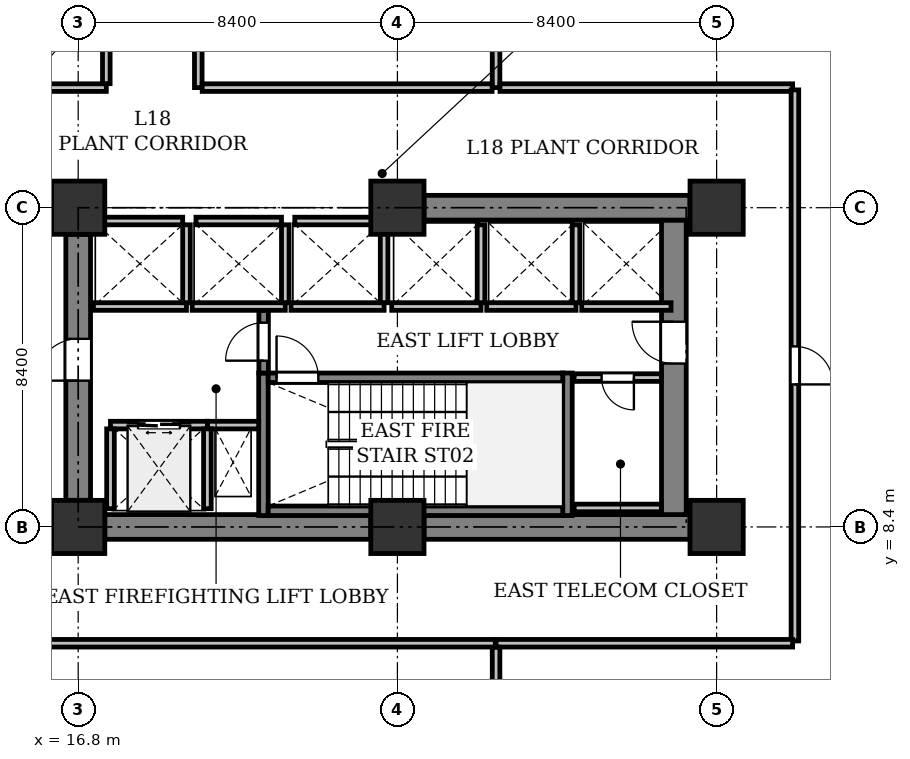
"""IFC4 building model, lengths in metres.
Left out: names, types, materials, properties, quantities, classifications, styles, units other than length and angle.
Written with IfcOpenShell. Run it as: python <this file> out.ifc"""

import sys

from ifc_helpers import new_model, si_unit, direction, frame, frame_2d, origin, origin_2d, place, context, subcontext, project, spatial, rectangle, extrude, element, fill, save


model = new_model("IFC4")
c1 = context("Model", 3, precision=1e-05, world=origin(), true_north=direction((0.0, 1.0)))
c2 = subcontext(c1, "Body", "Model", "MODEL_VIEW")
j1 = project(units=[si_unit("LENGTHUNIT", "METRE"), si_unit("PLANEANGLEUNIT", "RADIAN")], contexts=[c1])
p1 = place(None, origin())
s1 = spatial("IfcSite", under=j1, at=p1, CompositionType="ELEMENT")
p2 = place(p1, origin())
s2 = spatial("IfcBuilding", under=s1, at=p2, CompositionType="ELEMENT")
p3 = place(p2, frame((0.0, 0.0, 79.4)))
s3 = spatial("IfcBuildingStorey", under=s2, at=p3, CompositionType="ELEMENT", Elevation=79.4)
for number, where, z_axis, x_axis in (
    (1, (16.8, 8.4, 0.0), (0.0, 0.0, 1.0), (1.0, 0.0, 0.0)),
    (2, (16.8, 16.8, 0.0), (0.0, 0.0, 1.0), (1.0, 0.0, 0.0)),
    (3, (25.2, 8.4, 0.0), (0.0, 0.0, 1.0), (1.0, 0.0, 0.0)),
    (4, (25.2, 16.8, 0.0), (0.0, 0.0, 1.0), (1.0, 0.0, 0.0)),
    (5, (33.6, 8.4, 0.0), (0.0, 0.0, 1.0), (1.0, 0.0, 0.0)),
    (6, (33.6, 16.8, 0.0), (0.0, 0.0, 1.0), (1.0, 0.0, 0.0)),
):
    element("IfcColumn", number, at=place(p3, frame(where, z_axis=z_axis, x_axis=x_axis)), inside=s3, PredefinedType="COLUMN", context=c2, shape_type="SweptSolid", body=[
        extrude(rectangle(XDim=1.4, YDim=1.4, at=origin_2d()), origin(), (0.0, 0.0, 1.0), 5.0),
    ])
for number, where, z_axis, x_axis in (
    (7, (17.5, 8.4, 0.0), (0.0, 0.0, 1.0), (1.0, 0.0, 0.0)),
    (8, (25.9, 8.4, 0.0), (0.0, 0.0, 1.0), (1.0, 0.0, 0.0)),
):
    element("IfcWall", number, at=place(p3, frame(where, z_axis=z_axis, x_axis=x_axis)), inside=s3, PredefinedType="SHEAR", context=c2, shape_type="SweptSolid", body=[
        extrude(rectangle(XDim=7.0, YDim=0.65, at=frame_2d((3.5, 0.0))), origin(), (0.0, 0.0, 1.0), 4.725),
    ])
p4 = place(p3, frame((32.475, 8.725, 0.0), z_axis=(0.0, 0.0, 1.0), x_axis=(0.0, 1.0, 0.0)))
e9 = element("IfcWall", 9, at=p4, inside=s3, PredefinedType="SHEAR", context=c2, shape_type="SweptSolid", body=[
    extrude(rectangle(XDim=7.75, YDim=0.65, at=frame_2d((3.875, 0.0))), origin(), (0.0, 0.0, 1.0), 4.725),
])
p5 = place(p4, frame((3.975, 0.0, 0.0)))
e10 = element("IfcOpeningElement", 10, at=p5, cuts=e9, PredefinedType="OPENING", context=c2, shape_type="SweptSolid", body=[
    extrude(rectangle(XDim=1.1, YDim=2.15, at=frame_2d((0.55, 1.075))), frame((0.0, 0.335, 0.0), z_axis=(0.0, -1.0, 0.0), x_axis=(1.0, 0.0, 0.0)), (0.0, 0.0, 1.0), 0.67),
])
p6 = place(p3, frame((16.8, 9.1, 0.0), z_axis=(0.0, 0.0, 1.0), x_axis=(0.0, 1.0, 0.0)))
e11 = element("IfcWall", 11, at=p6, inside=s3, PredefinedType="SHEAR", context=c2, shape_type="SweptSolid", body=[
    extrude(rectangle(XDim=7.0, YDim=0.65, at=frame_2d((3.5, 0.0))), origin(), (0.0, 0.0, 1.0), 4.725),
])
p7 = place(p6, frame((3.15, 0.0, 0.0)))
e12 = element("IfcOpeningElement", 12, at=p7, cuts=e11, PredefinedType="OPENING", context=c2, shape_type="SweptSolid", body=[
    extrude(rectangle(XDim=1.1, YDim=2.15, at=frame_2d((0.55, 1.075))), frame((0.0, 0.335, 0.0), z_axis=(0.0, -1.0, 0.0), x_axis=(1.0, 0.0, 0.0)), (0.0, 0.0, 1.0), 0.67),
])
p8 = place(p3, frame((25.9, 16.8, 0.0), z_axis=(0.0, 0.0, 1.0), x_axis=(1.0, 0.0, 0.0)))
e13 = element("IfcWall", 13, at=p8, inside=s3, PredefinedType="SHEAR", context=c2, shape_type="SweptSolid", body=[
    extrude(rectangle(XDim=7.0, YDim=0.65, at=frame_2d((3.5, 0.0))), origin(), (0.0, 0.0, 1.0), 4.725),
])
for number, where, z_axis, x_axis in (
    (14, (21.675, 8.7, 0.0), (0.0, 0.0, 1.0), (0.0, 1.0, 0.0)),
    (15, (29.675, 8.7, 0.0), (0.0, 0.0, 1.0), (0.0, 1.0, 0.0)),
):
    element("IfcWall", number, at=place(p3, frame(where, z_axis=z_axis, x_axis=x_axis)), inside=s3, PredefinedType="SHEAR", context=c2, shape_type="SweptSolid", body=[
        extrude(rectangle(XDim=3.75, YDim=0.25, at=frame_2d((1.875, 0.0))), origin(), (0.0, 0.0, 1.0), 4.725),
    ])
p9 = place(p3, frame((21.8, 8.825, 0.0), z_axis=(0.0, 0.0, 1.0), x_axis=(1.0, 0.0, 0.0)))
e16 = element("IfcWall", 16, at=p9, inside=s3, PredefinedType="SHEAR", context=c2, shape_type="SweptSolid", body=[
    extrude(rectangle(XDim=7.75, YDim=0.25, at=frame_2d((3.875, 0.0))), origin(), (0.0, 0.0, 1.0), 4.725),
])
p10 = place(p3, frame((21.8, 12.325, 0.0), z_axis=(0.0, 0.0, 1.0), x_axis=(1.0, 0.0, 0.0)))
e17 = element("IfcWall", 17, at=p10, inside=s3, PredefinedType="SHEAR", context=c2, shape_type="SweptSolid", body=[
    extrude(rectangle(XDim=7.75, YDim=0.25, at=frame_2d((3.875, 0.0))), origin(), (0.0, 0.0, 1.0), 4.725),
])
p11 = place(p10, frame((0.22, 0.0, 0.0)))
e18 = element("IfcOpeningElement", 18, at=p11, cuts=e17, PredefinedType="OPENING", context=c2, shape_type="SweptSolid", body=[
    extrude(rectangle(XDim=1.1, YDim=2.15, at=frame_2d((0.55, 1.075))), frame((0.0, 0.135, 0.0), z_axis=(0.0, -1.0, 0.0), x_axis=(1.0, 0.0, 0.0)), (0.0, 0.0, 1.0), 0.27),
])
p12 = place(p3, frame((20.2, 11.08, 0.0), z_axis=(0.0, 0.0, 1.0), x_axis=(1.0, 0.0, 0.0)))
e19 = element("IfcWall", 19, at=p12, inside=s3, PredefinedType="PARTITIONING", context=c2, shape_type="SweptSolid", body=[
    extrude(rectangle(XDim=1.35, YDim=0.2, at=frame_2d((0.675, 0.0))), origin(), (0.0, 0.0, 1.0), 4.725),
])
p13 = place(p3, frame((21.68, 12.45, 0.0), z_axis=(0.0, 0.0, 1.0), x_axis=(0.0, 1.0, 0.0)))
e20 = element("IfcWall", 20, at=p13, inside=s3, PredefinedType="SHEAR", context=c2, shape_type="SweptSolid", body=[
    extrude(rectangle(XDim=1.65, YDim=0.25, at=frame_2d((0.825, 0.0))), origin(), (0.0, 0.0, 1.0), 4.725),
])
p14 = place(p13, frame((0.325, 0.0, 0.0)))
e21 = element("IfcOpeningElement", 21, at=p14, cuts=e20, PredefinedType="OPENING", context=c2, shape_type="SweptSolid", body=[
    extrude(rectangle(XDim=1.0, YDim=2.15, at=frame_2d((0.5, 1.075))), frame((0.0, 0.135, 0.0), z_axis=(0.0, -1.0, 0.0), x_axis=(1.0, 0.0, 0.0)), (0.0, 0.0, 1.0), 0.27),
])
p15 = place(p3, frame((17.65, 11.08, 0.0), z_axis=(0.0, 0.0, 1.0), x_axis=(1.0, 0.0, 0.0)))
e22 = element("IfcWall", 22, at=p15, inside=s3, PredefinedType="PARTITIONING", context=c2, shape_type="SweptSolid", body=[
    extrude(rectangle(XDim=2.55, YDim=0.2, at=frame_2d((1.275, 0.0))), origin(), (0.0, 0.0, 1.0), 4.725),
])
p16 = place(p15, frame((0.725, 0.0, 0.0)))
e23 = element("IfcOpeningElement", 23, at=p16, cuts=e22, PredefinedType="OPENING", context=c2, shape_type="SweptSolid", body=[
    extrude(rectangle(XDim=1.1, YDim=2.2, at=frame_2d((0.55, 1.1))), frame((0.0, 0.11, 0.0), z_axis=(0.0, -1.0, 0.0), x_axis=(1.0, 0.0, 0.0)), (0.0, 0.0, 1.0), 0.22),
])
for number, where, z_axis, x_axis in (
    (24, (20.2, 8.88, 0.0), (0.0, 0.0, 1.0), (0.0, 1.0, 0.0)),
    (25, (17.65, 8.88, 0.0), (0.0, 0.0, 1.0), (0.0, 1.0, 0.0)),
):
    element("IfcWall", number, at=place(p3, frame(where, z_axis=z_axis, x_axis=x_axis)), inside=s3, PredefinedType="PARTITIONING", context=c2, shape_type="SweptSolid", body=[
        extrude(rectangle(XDim=2.1, YDim=0.2, at=frame_2d((1.05, 0.0))), origin(), (0.0, 0.0, 1.0), 4.725),
    ])
p17 = place(p3, frame((17.2, 14.2, 0.0), z_axis=(0.0, 0.0, 1.0), x_axis=(1.0, 0.0, 0.0)))
e26 = element("IfcWall", 26, at=p17, inside=s3, PredefinedType="PARTITIONING", context=c2, shape_type="SweptSolid", body=[
    extrude(rectangle(XDim=2.45, YDim=0.2, at=frame_2d((1.225, 0.0))), origin(), (0.0, 0.0, 1.0), 4.725),
])
p18 = place(p3, frame((19.65, 14.3, 0.0), z_axis=(0.0, 0.0, 1.0), x_axis=(0.0, 1.0, 0.0)))
e27 = element("IfcWall", 27, at=p18, inside=s3, PredefinedType="PARTITIONING", context=c2, shape_type="SweptSolid", body=[
    extrude(rectangle(XDim=2.05, YDim=0.2, at=frame_2d((1.025, 0.0))), origin(), (0.0, 0.0, 1.0), 4.725),
])
p19 = place(p3, frame((17.3, 16.45, 0.0), z_axis=(0.0, 0.0, 1.0), x_axis=(1.0, 0.0, 0.0)))
e28 = element("IfcWall", 28, at=p19, inside=s3, PredefinedType="PARTITIONING", context=c2, shape_type="SweptSolid", body=[
    extrude(rectangle(XDim=2.25, YDim=0.2, at=frame_2d((1.125, 0.0))), origin(), (0.0, 0.0, 1.0), 4.725),
])
p20 = place(p3, frame((19.8, 14.2, 0.0), z_axis=(0.0, 0.0, 1.0), x_axis=(1.0, 0.0, 0.0)))
e29 = element("IfcWall", 29, at=p20, inside=s3, PredefinedType="PARTITIONING", context=c2, shape_type="SweptSolid", body=[
    extrude(rectangle(XDim=2.45, YDim=0.2, at=frame_2d((1.225, 0.0))), origin(), (0.0, 0.0, 1.0), 4.725),
])
p21 = place(p3, frame((22.25, 14.3, 0.0), z_axis=(0.0, 0.0, 1.0), x_axis=(0.0, 1.0, 0.0)))
e30 = element("IfcWall", 30, at=p21, inside=s3, PredefinedType="PARTITIONING", context=c2, shape_type="SweptSolid", body=[
    extrude(rectangle(XDim=2.05, YDim=0.2, at=frame_2d((1.025, 0.0))), origin(), (0.0, 0.0, 1.0), 4.725),
])
p22 = place(p3, frame((19.9, 16.45, 0.0), z_axis=(0.0, 0.0, 1.0), x_axis=(1.0, 0.0, 0.0)))
e31 = element("IfcWall", 31, at=p22, inside=s3, PredefinedType="PARTITIONING", context=c2, shape_type="SweptSolid", body=[
    extrude(rectangle(XDim=2.25, YDim=0.2, at=frame_2d((1.125, 0.0))), origin(), (0.0, 0.0, 1.0), 4.725),
])
p23 = place(p3, frame((22.4, 14.2, 0.0), z_axis=(0.0, 0.0, 1.0), x_axis=(1.0, 0.0, 0.0)))
e32 = element("IfcWall", 32, at=p23, inside=s3, PredefinedType="PARTITIONING", context=c2, shape_type="SweptSolid", body=[
    extrude(rectangle(XDim=2.45, YDim=0.2, at=frame_2d((1.225, 0.0))), origin(), (0.0, 0.0, 1.0), 4.725),
])
p24 = place(p3, frame((24.85, 14.3, 0.0), z_axis=(0.0, 0.0, 1.0), x_axis=(0.0, 1.0, 0.0)))
e33 = element("IfcWall", 33, at=p24, inside=s3, PredefinedType="PARTITIONING", context=c2, shape_type="SweptSolid", body=[
    extrude(rectangle(XDim=2.05, YDim=0.2, at=frame_2d((1.025, 0.0))), origin(), (0.0, 0.0, 1.0), 4.725),
])
p25 = place(p3, frame((22.5, 16.45, 0.0), z_axis=(0.0, 0.0, 1.0), x_axis=(1.0, 0.0, 0.0)))
e34 = element("IfcWall", 34, at=p25, inside=s3, PredefinedType="PARTITIONING", context=c2, shape_type="SweptSolid", body=[
    extrude(rectangle(XDim=2.25, YDim=0.2, at=frame_2d((1.125, 0.0))), origin(), (0.0, 0.0, 1.0), 4.725),
])
p26 = place(p3, frame((25.05, 14.2, 0.0), z_axis=(0.0, 0.0, 1.0), x_axis=(1.0, 0.0, 0.0)))
e35 = element("IfcWall", 35, at=p26, inside=s3, PredefinedType="PARTITIONING", context=c2, shape_type="SweptSolid", body=[
    extrude(rectangle(XDim=2.35, YDim=0.2, at=frame_2d((1.175, 0.0))), origin(), (0.0, 0.0, 1.0), 4.725),
])
p27 = place(p3, frame((27.4, 14.3, 0.0), z_axis=(0.0, 0.0, 1.0), x_axis=(0.0, 1.0, 0.0)))
e36 = element("IfcWall", 36, at=p27, inside=s3, PredefinedType="PARTITIONING", context=c2, shape_type="SweptSolid", body=[
    extrude(rectangle(XDim=2.05, YDim=0.2, at=frame_2d((1.025, 0.0))), origin(), (0.0, 0.0, 1.0), 4.725),
])
p28 = place(p3, frame((27.55, 14.2, 0.0), z_axis=(0.0, 0.0, 1.0), x_axis=(1.0, 0.0, 0.0)))
e37 = element("IfcWall", 37, at=p28, inside=s3, PredefinedType="PARTITIONING", context=c2, shape_type="SweptSolid", body=[
    extrude(rectangle(XDim=2.35, YDim=0.2, at=frame_2d((1.175, 0.0))), origin(), (0.0, 0.0, 1.0), 4.725),
])
p29 = place(p3, frame((29.9, 14.3, 0.0), z_axis=(0.0, 0.0, 1.0), x_axis=(0.0, 1.0, 0.0)))
e38 = element("IfcWall", 38, at=p29, inside=s3, PredefinedType="PARTITIONING", context=c2, shape_type="SweptSolid", body=[
    extrude(rectangle(XDim=2.05, YDim=0.2, at=frame_2d((1.025, 0.0))), origin(), (0.0, 0.0, 1.0), 4.725),
])
p30 = place(p3, frame((30.05, 14.2, 0.0), z_axis=(0.0, 0.0, 1.0), x_axis=(1.0, 0.0, 0.0)))
e39 = element("IfcWall", 39, at=p30, inside=s3, PredefinedType="PARTITIONING", context=c2, shape_type="SweptSolid", body=[
    extrude(rectangle(XDim=2.35, YDim=0.2, at=frame_2d((1.175, 0.0))), origin(), (0.0, 0.0, 1.0), 4.725),
])
p31 = place(p3, frame((32.146, 12.33, 0.0), z_axis=(0.0, 0.0, 1.0), x_axis=(-1.0, 0.0, 0.0)))
e40 = element("IfcWall", 40, at=p31, inside=s3, PredefinedType="PARTITIONING", context=c2, shape_type="SweptSolid", body=[
    extrude(rectangle(XDim=2.296, YDim=0.2, at=frame_2d((1.148, 0.0))), origin(), (0.0, 0.0, 1.0), 4.725),
])
p32 = place(p31, frame((0.723, 0.0, 0.0)))
e41 = element("IfcOpeningElement", 41, at=p32, cuts=e40, PredefinedType="OPENING", context=c2, shape_type="SweptSolid", body=[
    extrude(rectangle(XDim=0.85, YDim=2.15, at=frame_2d((0.425, 1.075))), frame((0.0, 0.11, 0.0), z_axis=(0.0, -1.0, 0.0), x_axis=(1.0, 0.0, 0.0)), (0.0, 0.0, 1.0), 0.22),
])
p33 = place(p3, frame((29.85, 8.9, 0.0), z_axis=(0.0, 0.0, 1.0), x_axis=(1.0, 0.0, 0.0)))
e42 = element("IfcWall", 42, at=p33, inside=s3, PredefinedType="PARTITIONING", context=c2, shape_type="SweptSolid", body=[
    extrude(rectangle(XDim=2.296, YDim=0.2, at=frame_2d((1.148, 0.0))), origin(), (0.0, 0.0, 1.0), 4.725),
])
p34 = place(p3, frame((27.796, 25.076, 0.0), z_axis=(0.0, 0.0, 1.0), x_axis=(0.0, -1.0, 0.0)))
e43 = element("IfcWall", 43, at=p34, inside=s3, PredefinedType="PARTITIONING", context=c2, shape_type="SweptSolid", body=[
    extrude(rectangle(XDim=5.116, YDim=0.2, at=frame_2d((2.558, 0.0))), origin(), (0.0, 0.0, 1.0), 3.825),
])
p35 = place(p3, frame((27.9, 19.96, 0.0), z_axis=(0.0, 0.0, 1.0), x_axis=(1.0, 0.0, 0.0)))
e44 = element("IfcWall", 44, at=p35, inside=s3, PredefinedType="PARTITIONING", context=c2, shape_type="SweptSolid", body=[
    extrude(rectangle(XDim=7.7, YDim=0.2, at=frame_2d((3.85, 0.0))), origin(), (0.0, 0.0, 1.0), 3.709),
])
p36 = place(p3, frame((35.66, 19.9, 0.0), z_axis=(0.0, 0.0, 1.0), x_axis=(0.0, -1.0, 0.0)))
e45 = element("IfcWall", 45, at=p36, inside=s3, PredefinedType="PARTITIONING", context=c2, shape_type="SweptSolid", body=[
    extrude(rectangle(XDim=14.5, YDim=0.2, at=frame_2d((7.25, 0.0))), origin(), (0.0, 0.0, 1.0), 3.825),
])
p37 = place(p36, frame((6.75, 0.0, 0.0)))
e46 = element("IfcOpeningElement", 46, at=p37, cuts=e45, PredefinedType="OPENING", context=c2, shape_type="SweptSolid", body=[
    extrude(rectangle(XDim=1.0, YDim=2.15, at=frame_2d((0.5, 1.075))), frame((0.0, 0.11, 0.0), z_axis=(0.0, -1.0, 0.0), x_axis=(1.0, 0.0, 0.0)), (0.0, 0.0, 1.0), 0.22),
])
p38 = place(p3, frame((35.6, 5.34, 0.0), z_axis=(0.0, 0.0, 1.0), x_axis=(-1.0, 0.0, 0.0)))
e47 = element("IfcWall", 47, at=p38, inside=s3, PredefinedType="PARTITIONING", context=c2, shape_type="SweptSolid", body=[
    extrude(rectangle(XDim=7.804, YDim=0.2, at=frame_2d((3.902, 0.0))), origin(), (0.0, 0.0, 1.0), 3.709),
])
p39 = place(p3, frame((27.796, 5.236, 0.0), z_axis=(0.0, 0.0, 1.0), x_axis=(0.0, -1.0, 0.0)))
e48 = element("IfcWall", 48, at=p39, inside=s3, PredefinedType="PARTITIONING", context=c2, shape_type="SweptSolid", body=[
    extrude(rectangle(XDim=5.112, YDim=0.2, at=frame_2d((2.556, 0.0))), origin(), (0.0, 0.0, 1.0), 4.725),
])
p40 = place(p3, frame((27.776, 5.34, 0.0), z_axis=(0.0, 0.0, 1.0), x_axis=(-1.0, 0.0, 0.0)))
e49 = element("IfcWall", 49, at=p40, inside=s3, PredefinedType="PARTITIONING", context=c2, shape_type="SweptSolid", body=[
    extrude(rectangle(XDim=13.626, YDim=0.2, at=frame_2d((6.813, 0.0))), origin(), (0.0, 0.0, 1.0), 3.709),
])
p41 = place(p3, frame((19.96, 33.296, 0.0), z_axis=(0.0, 0.0, 1.0), x_axis=(0.0, -1.0, 0.0)))
e50 = element("IfcWall", 50, at=p41, inside=s3, PredefinedType="PARTITIONING", context=c2, shape_type="SweptSolid", body=[
    extrude(rectangle(XDim=13.336, YDim=0.2, at=frame_2d((6.668, 0.0))), origin(), (0.0, 0.0, 1.0), 3.825),
])
p42 = place(p41, frame((6.168, 0.0, 0.0)))
e51 = element("IfcOpeningElement", 51, at=p42, cuts=e50, PredefinedType="OPENING", context=c2, shape_type="SweptSolid", body=[
    extrude(rectangle(XDim=1.0, YDim=2.15, at=frame_2d((0.5, 1.075))), frame((0.0, 0.11, 0.0), z_axis=(0.0, -1.0, 0.0), x_axis=(1.0, 0.0, 0.0)), (0.0, 0.0, 1.0), 0.22),
])
p43 = place(p3, frame((20.064, 19.96, 0.0), z_axis=(0.0, 0.0, 1.0), x_axis=(1.0, 0.0, 0.0)))
e52 = element("IfcWall", 52, at=p43, inside=s3, PredefinedType="PARTITIONING", context=c2, shape_type="SweptSolid", body=[
    extrude(rectangle(XDim=7.628, YDim=0.2, at=frame_2d((3.814, 0.0))), origin(), (0.0, 0.0, 1.0), 3.709),
])
p44 = place(p3, frame((14.364, 19.96, 0.0), z_axis=(0.0, 0.0, 1.0), x_axis=(1.0, 0.0, 0.0)))
e53 = element("IfcWall", 53, at=p44, inside=s3, PredefinedType="PARTITIONING", context=c2, shape_type="SweptSolid", body=[
    extrude(rectangle(XDim=3.176, YDim=0.2, at=frame_2d((1.588, 0.0))), origin(), (0.0, 0.0, 1.0), 3.709),
])
p45 = place(p3, frame((17.54, 20.064, 0.0), z_axis=(0.0, 0.0, 1.0), x_axis=(0.0, 1.0, 0.0)))
e54 = element("IfcWall", 54, at=p45, inside=s3, PredefinedType="PARTITIONING", context=c2, shape_type="SweptSolid", body=[
    extrude(rectangle(XDim=4.436, YDim=0.2, at=frame_2d((2.218, 0.0))), origin(), (0.0, 0.0, 1.0), 4.725),
])
p46 = place(p5, origin())
e55 = element("IfcDoor", 55, at=p46, inside=s3, OperationType="SINGLE_SWING_RIGHT", PredefinedType="DOOR", context=c2, shape_type="SweptSolid", body=[
    extrude(rectangle(XDim=1.1, YDim=2.15, at=frame_2d((0.55, 1.075))), frame((0.0, 0.025, 0.0), z_axis=(0.0, -1.0, 0.0), x_axis=(1.0, 0.0, 0.0)), (0.0, 0.0, 1.0), 0.05),
])
fill(e10, e55)
p47 = place(p7, origin())
e56 = element("IfcDoor", 56, at=p47, inside=s3, OperationType="SINGLE_SWING_LEFT", PredefinedType="DOOR", context=c2, shape_type="SweptSolid", body=[
    extrude(rectangle(XDim=1.1, YDim=2.15, at=frame_2d((0.55, 1.075))), frame((0.0, 0.025, 0.0), z_axis=(0.0, -1.0, 0.0), x_axis=(1.0, 0.0, 0.0)), (0.0, 0.0, 1.0), 0.05),
])
fill(e12, e56)
p48 = place(p11, origin())
e57 = element("IfcDoor", 57, at=p48, inside=s3, OperationType="SINGLE_SWING_LEFT", PredefinedType="DOOR", context=c2, shape_type="SweptSolid", body=[
    extrude(rectangle(XDim=1.1, YDim=2.15, at=frame_2d((0.55, 1.075))), frame((0.0, 0.025, 0.0), z_axis=(0.0, -1.0, 0.0), x_axis=(1.0, 0.0, 0.0)), (0.0, 0.0, 1.0), 0.05),
])
fill(e18, e57)
p49 = place(p14, origin())
e58 = element("IfcDoor", 58, at=p49, inside=s3, OperationType="SINGLE_SWING_LEFT", PredefinedType="DOOR", context=c2, shape_type="SweptSolid", body=[
    extrude(rectangle(XDim=1.0, YDim=2.15, at=frame_2d((0.5, 1.075))), frame((0.0, 0.025, 0.0), z_axis=(0.0, -1.0, 0.0), x_axis=(1.0, 0.0, 0.0)), (0.0, 0.0, 1.0), 0.05),
])
fill(e21, e58)
p50 = place(p16, origin())
e59 = element("IfcDoor", 59, at=p50, inside=s3, OperationType="DOUBLE_DOOR_SLIDING", PredefinedType="DOOR", context=c2, shape_type="SweptSolid", body=[
    extrude(rectangle(XDim=1.1, YDim=2.2, at=frame_2d((0.55, 1.1))), frame((0.0, 0.025, 0.0), z_axis=(0.0, -1.0, 0.0), x_axis=(1.0, 0.0, 0.0)), (0.0, 0.0, 1.0), 0.05),
])
fill(e23, e59)
p51 = place(p32, origin())
e60 = element("IfcDoor", 60, at=p51, inside=s3, OperationType="SINGLE_SWING_LEFT", PredefinedType="DOOR", context=c2, shape_type="SweptSolid", body=[
    extrude(rectangle(XDim=0.85, YDim=2.15, at=frame_2d((0.425, 1.075))), frame((0.0, 0.025, 0.0), z_axis=(0.0, -1.0, 0.0), x_axis=(1.0, 0.0, 0.0)), (0.0, 0.0, 1.0), 0.05),
])
fill(e41, e60)
p52 = place(p37, origin())
e61 = element("IfcDoor", 61, at=p52, inside=s3, OperationType="SINGLE_SWING_RIGHT", PredefinedType="DOOR", context=c2, shape_type="SweptSolid", body=[
    extrude(rectangle(XDim=1.0, YDim=2.15, at=frame_2d((0.5, 1.075))), frame((0.0, 0.025, 0.0), z_axis=(0.0, -1.0, 0.0), x_axis=(1.0, 0.0, 0.0)), (0.0, 0.0, 1.0), 0.05),
])
fill(e46, e61)
save(model, sys.argv[1])
